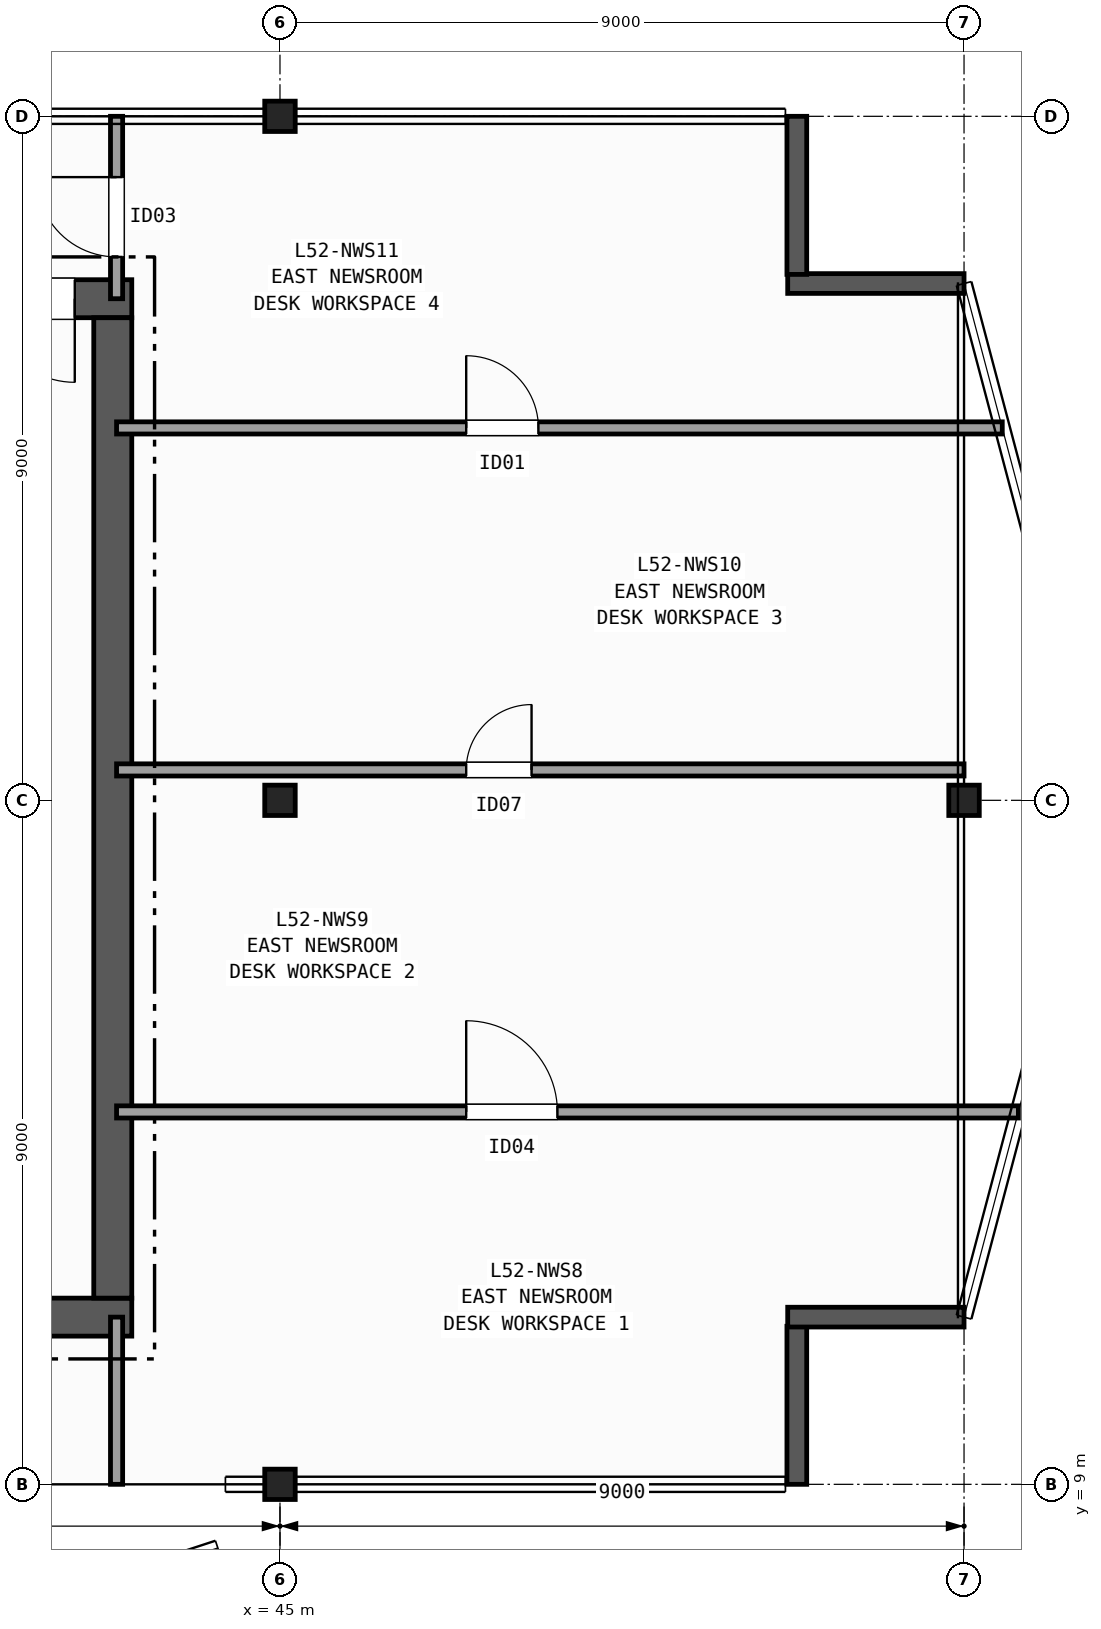
"""IFC4 building model, lengths in metres.
Left out: names, types, materials, properties, quantities, classifications, styles, units other than length and angle.
Written with IfcOpenShell. Run it as: python <this file> out.ifc"""

import sys

from ifc_helpers import new_model, si_unit, direction, frame, frame_2d, origin, origin_2d, place, context, subcontext, project, spatial, rectangle, i_section, extrude, element, fill, save


model = new_model("IFC4")
c1 = context("Model", 3, precision=1e-05, world=origin(), true_north=direction((0.0, 1.0)))
c2 = subcontext(c1, "Body", "Model", "MODEL_VIEW")
j1 = project(units=[si_unit("LENGTHUNIT", "METRE"), si_unit("PLANEANGLEUNIT", "RADIAN")], contexts=[c1])
p1 = place(None, origin())
s1 = spatial("IfcSite", under=j1, at=p1, CompositionType="ELEMENT")
p2 = place(p1, origin())
s2 = spatial("IfcBuilding", under=s1, at=p2, CompositionType="ELEMENT")
p3 = place(p2, frame((0.0, 0.0, 209.9)))
s3 = spatial("IfcBuildingStorey", under=s2, at=p3, CompositionType="ELEMENT", Elevation=209.9)
for number, where, z_axis, x_axis in (
    (1, (45.0, 9.0, 0.0), (0.0, 0.0, 1.0), (1.0, 0.0, 0.0)),
    (2, (45.0, 18.0, 0.0), (0.0, 0.0, 1.0), (1.0, 0.0, 0.0)),
    (3, (45.0, 27.0, 0.0), (0.0, 0.0, 1.0), (1.0, 0.0, 0.0)),
    (4, (54.0, 18.0, 0.0), (0.0, 0.0, 1.0), (1.0, 0.0, 0.0)),
):
    element("IfcColumn", number, at=place(p3, frame(where, z_axis=z_axis, x_axis=x_axis)), inside=s3, PredefinedType="COLUMN", context=c2, shape_type="SweptSolid", body=[
        extrude(i_section(OverallWidth=0.401, OverallDepth=0.399, WebThickness=0.025, FlangeThickness=0.04, FilletRadius=0.015, at=origin_2d()), origin(), (0.0, 0.0, 1.0), 3.7),
    ])
p4 = place(p3, frame((51.8, 9.0, 0.0), z_axis=(0.0, 0.0, 1.0), x_axis=(0.0, 1.0, 0.0)))
e5 = element("IfcWall", 5, at=p4, inside=s3, PredefinedType="SOLIDWALL", context=c2, shape_type="SweptSolid", body=[
    extrude(rectangle(XDim=2.08, YDim=0.26, at=frame_2d((1.04, 0.0))), origin(), (0.0, 0.0, 1.0), 3.42),
])
for number, where, z_axis, x_axis in (
    (6, (51.68, 11.2, 0.0), (0.0, 0.0, 1.0), (1.0, 0.0, 0.0)),
    (7, (54.0, 24.8, 0.0), (0.0, 0.0, 1.0), (-1.0, 0.0, 0.0)),
):
    element("IfcWall", number, at=place(p3, frame(where, z_axis=z_axis, x_axis=x_axis)), inside=s3, PredefinedType="SOLIDWALL", context=c2, shape_type="SweptSolid", body=[
        extrude(rectangle(XDim=2.32, YDim=0.26, at=frame_2d((1.16, 0.0))), origin(), (0.0, 0.0, 1.0), 3.42),
    ])
p5 = place(p3, frame((51.8, 24.92, 0.0), z_axis=(0.0, 0.0, 1.0), x_axis=(0.0, 1.0, 0.0)))
e8 = element("IfcWall", 8, at=p5, inside=s3, PredefinedType="SOLIDWALL", context=c2, shape_type="SweptSolid", body=[
    extrude(rectangle(XDim=2.08, YDim=0.26, at=frame_2d((1.04, 0.0))), origin(), (0.0, 0.0, 1.0), 3.42),
])
p6 = place(p3, frame((29.15, 11.2, 0.0), z_axis=(0.0, 0.0, 1.0), x_axis=(1.0, 0.0, 0.0)))
e9 = element("IfcWall", 9, at=p6, inside=s3, PredefinedType="SHEAR", context=c2, shape_type="SweptSolid", body=[
    extrude(rectangle(XDim=13.9, YDim=0.5, at=frame_2d((6.95, 0.0))), origin(), (0.0, 0.0, 1.0), 3.42),
])
p7 = place(p3, frame((43.05, 24.6, 0.0), z_axis=(0.0, 0.0, 1.0), x_axis=(-1.0, 0.0, 0.0)))
e10 = element("IfcWall", 10, at=p7, inside=s3, PredefinedType="SHEAR", context=c2, shape_type="SweptSolid", body=[
    extrude(rectangle(XDim=13.9, YDim=0.5, at=frame_2d((6.95, 0.0))), origin(), (0.0, 0.0, 1.0), 3.42),
])
p8 = place(p7, frame((0.75, 0.0, 0.0)))
e11 = element("IfcOpeningElement", 11, at=p8, cuts=e10, PredefinedType="OPENING", context=c2, shape_type="SweptSolid", body=[
    extrude(rectangle(XDim=1.1, YDim=2.15, at=frame_2d((0.55, 1.075))), frame((0.0, 0.26, 0.0), z_axis=(0.0, -1.0, 0.0), x_axis=(1.0, 0.0, 0.0)), (0.0, 0.0, 1.0), 0.52),
])
p9 = place(p7, frame((2.25, 0.0, 0.0)))
e12 = element("IfcOpeningElement", 12, at=p9, cuts=e10, PredefinedType="OPENING", context=c2, shape_type="SweptSolid", body=[
    extrude(rectangle(XDim=0.9, YDim=2.1, at=frame_2d((0.45, 1.05))), frame((0.0, 0.26, 0.0), z_axis=(0.0, -1.0, 0.0), x_axis=(1.0, 0.0, 0.0)), (0.0, 0.0, 1.0), 0.52),
])
p10 = place(p7, frame((3.55, 0.0, 0.0)))
e13 = element("IfcOpeningElement", 13, at=p10, cuts=e10, PredefinedType="OPENING", context=c2, shape_type="SweptSolid", body=[
    extrude(rectangle(XDim=0.9, YDim=2.1, at=frame_2d((0.45, 1.05))), frame((0.0, 0.26, 0.0), z_axis=(0.0, -1.0, 0.0), x_axis=(1.0, 0.0, 0.0)), (0.0, 0.0, 1.0), 0.52),
])
p11 = place(p7, frame((4.9, 0.0, 0.0)))
e14 = element("IfcOpeningElement", 14, at=p11, cuts=e10, PredefinedType="OPENING", context=c2, shape_type="SweptSolid", body=[
    extrude(rectangle(XDim=0.9, YDim=2.1, at=frame_2d((0.45, 1.05))), frame((0.0, 0.26, 0.0), z_axis=(0.0, -1.0, 0.0), x_axis=(1.0, 0.0, 0.0)), (0.0, 0.0, 1.0), 0.52),
])
p12 = place(p3, frame((42.8, 11.45, 0.0), z_axis=(0.0, 0.0, 1.0), x_axis=(0.0, 1.0, 0.0)))
e15 = element("IfcWall", 15, at=p12, inside=s3, PredefinedType="SHEAR", context=c2, shape_type="SweptSolid", body=[
    extrude(rectangle(XDim=12.9, YDim=0.5, at=frame_2d((6.45, 0.0))), origin(), (0.0, 0.0, 1.0), 3.42),
])
p13 = place(p3, frame((42.85, 9.0, 0.0), z_axis=(0.0, 0.0, 1.0), x_axis=(0.0, 1.0, 0.0)))
e16 = element("IfcWall", 16, at=p13, inside=s3, PredefinedType="PARTITIONING", context=c2, shape_type="SweptSolid", body=[
    extrude(rectangle(XDim=2.2, YDim=0.16, at=frame_2d((1.1, 0.0))), origin(), (0.0, 0.0, 1.0), 2.707),
])
p14 = place(p3, frame((42.85, 24.6, 0.0), z_axis=(0.0, 0.0, 1.0), x_axis=(0.0, 1.0, 0.0)))
e17 = element("IfcWall", 17, at=p14, inside=s3, PredefinedType="PARTITIONING", context=c2, shape_type="SweptSolid", body=[
    extrude(rectangle(XDim=2.4, YDim=0.16, at=frame_2d((1.2, 0.0))), origin(), (0.0, 0.0, 1.0), 2.707),
])
p15 = place(p14, frame((0.55, 0.0, 0.0)))
e18 = element("IfcOpeningElement", 18, at=p15, cuts=e17, PredefinedType="OPENING", context=c2, shape_type="SweptSolid", body=[
    extrude(rectangle(XDim=1.05, YDim=2.15, at=frame_2d((0.525, 1.075))), frame((0.0, 0.09, 0.0), z_axis=(0.0, -1.0, 0.0), x_axis=(1.0, 0.0, 0.0)), (0.0, 0.0, 1.0), 0.18),
])
p16 = place(p3, frame((42.85, 13.9, 0.0), z_axis=(0.0, 0.0, 1.0), x_axis=(1.0, 0.0, 0.0)))
e19 = element("IfcWall", 19, at=p16, inside=s3, PredefinedType="PARTITIONING", context=c2, shape_type="SweptSolid", body=[
    extrude(rectangle(XDim=11.865, YDim=0.16, at=frame_2d((5.933, 0.0))), origin(), (0.0, 0.0, 1.0), 3.42),
])
p17 = place(p16, frame((4.6, 0.0, 0.0)))
e20 = element("IfcOpeningElement", 20, at=p17, cuts=e19, PredefinedType="OPENING", context=c2, shape_type="SweptSolid", body=[
    extrude(rectangle(XDim=1.2, YDim=2.15, at=frame_2d((0.6, 1.075))), frame((0.0, 0.09, 0.0), z_axis=(0.0, -1.0, 0.0), x_axis=(1.0, 0.0, 0.0)), (0.0, 0.0, 1.0), 0.18),
])
p18 = place(p3, frame((42.85, 18.4, 0.0), z_axis=(0.0, 0.0, 1.0), x_axis=(1.0, 0.0, 0.0)))
e21 = element("IfcWall", 21, at=p18, inside=s3, PredefinedType="PARTITIONING", context=c2, shape_type="SweptSolid", body=[
    extrude(rectangle(XDim=11.15, YDim=0.16, at=frame_2d((5.575, 0.0))), origin(), (0.0, 0.0, 1.0), 3.42),
])
p19 = place(p18, frame((4.6, 0.0, 0.0)))
e22 = element("IfcOpeningElement", 22, at=p19, cuts=e21, PredefinedType="OPENING", context=c2, shape_type="SweptSolid", body=[
    extrude(rectangle(XDim=0.86, YDim=2.05, at=frame_2d((0.43, 1.025))), frame((0.0, 0.09, 0.0), z_axis=(0.0, -1.0, 0.0), x_axis=(1.0, 0.0, 0.0)), (0.0, 0.0, 1.0), 0.18),
])
p20 = place(p3, frame((42.85, 22.9, 0.0), z_axis=(0.0, 0.0, 1.0), x_axis=(1.0, 0.0, 0.0)))
e23 = element("IfcWall", 23, at=p20, inside=s3, PredefinedType="PARTITIONING", context=c2, shape_type="SweptSolid", body=[
    extrude(rectangle(XDim=11.653, YDim=0.16, at=frame_2d((5.826, 0.0))), origin(), (0.0, 0.0, 1.0), 3.42),
])
p21 = place(p20, frame((4.6, 0.0, 0.0)))
e24 = element("IfcOpeningElement", 24, at=p21, cuts=e23, PredefinedType="OPENING", context=c2, shape_type="SweptSolid", body=[
    extrude(rectangle(XDim=0.95, YDim=2.1, at=frame_2d((0.475, 1.05))), frame((0.0, 0.09, 0.0), z_axis=(0.0, -1.0, 0.0), x_axis=(1.0, 0.0, 0.0)), (0.0, 0.0, 1.0), 0.18),
])
p22 = place(p8, origin())
e25 = element("IfcDoor", 25, at=p22, inside=s3, OperationType="SINGLE_SWING_LEFT", PredefinedType="DOOR", context=c2, shape_type="SweptSolid", body=[
    extrude(rectangle(XDim=1.1, YDim=2.15, at=frame_2d((0.55, 1.075))), frame((0.0, 0.025, 0.0), z_axis=(0.0, -1.0, 0.0), x_axis=(1.0, 0.0, 0.0)), (0.0, 0.0, 1.0), 0.05),
])
fill(e11, e25)
p23 = place(p15, origin())
e26 = element("IfcDoor", 26, at=p23, inside=s3, OperationType="SINGLE_SWING_RIGHT", PredefinedType="DOOR", context=c2, shape_type="SweptSolid", body=[
    extrude(rectangle(XDim=1.05, YDim=2.15, at=frame_2d((0.525, 1.075))), frame((0.0, 0.025, 0.0), z_axis=(0.0, -1.0, 0.0), x_axis=(1.0, 0.0, 0.0)), (0.0, 0.0, 1.0), 0.05),
])
fill(e18, e26)
p24 = place(p17, origin())
e27 = element("IfcDoor", 27, at=p24, inside=s3, OperationType="SINGLE_SWING_LEFT", PredefinedType="DOOR", context=c2, shape_type="SweptSolid", body=[
    extrude(rectangle(XDim=1.2, YDim=2.15, at=frame_2d((0.6, 1.075))), frame((0.0, 0.025, 0.0), z_axis=(0.0, -1.0, 0.0), x_axis=(1.0, 0.0, 0.0)), (0.0, 0.0, 1.0), 0.05),
])
fill(e20, e27)
p25 = place(p19, origin())
e28 = element("IfcDoor", 28, at=p25, inside=s3, OperationType="SINGLE_SWING_RIGHT", PredefinedType="DOOR", context=c2, shape_type="SweptSolid", body=[
    extrude(rectangle(XDim=0.86, YDim=2.05, at=frame_2d((0.43, 1.025))), frame((0.0, 0.025, 0.0), z_axis=(0.0, -1.0, 0.0), x_axis=(1.0, 0.0, 0.0)), (0.0, 0.0, 1.0), 0.05),
])
fill(e22, e28)
p26 = place(p21, origin())
e29 = element("IfcDoor", 29, at=p26, inside=s3, OperationType="SINGLE_SWING_LEFT", PredefinedType="DOOR", context=c2, shape_type="SweptSolid", body=[
    extrude(rectangle(XDim=0.95, YDim=2.1, at=frame_2d((0.475, 1.05))), frame((0.0, 0.025, 0.0), z_axis=(0.0, -1.0, 0.0), x_axis=(1.0, 0.0, 0.0)), (0.0, 0.0, 1.0), 0.05),
])
fill(e24, e29)
save(model, sys.argv[1])
